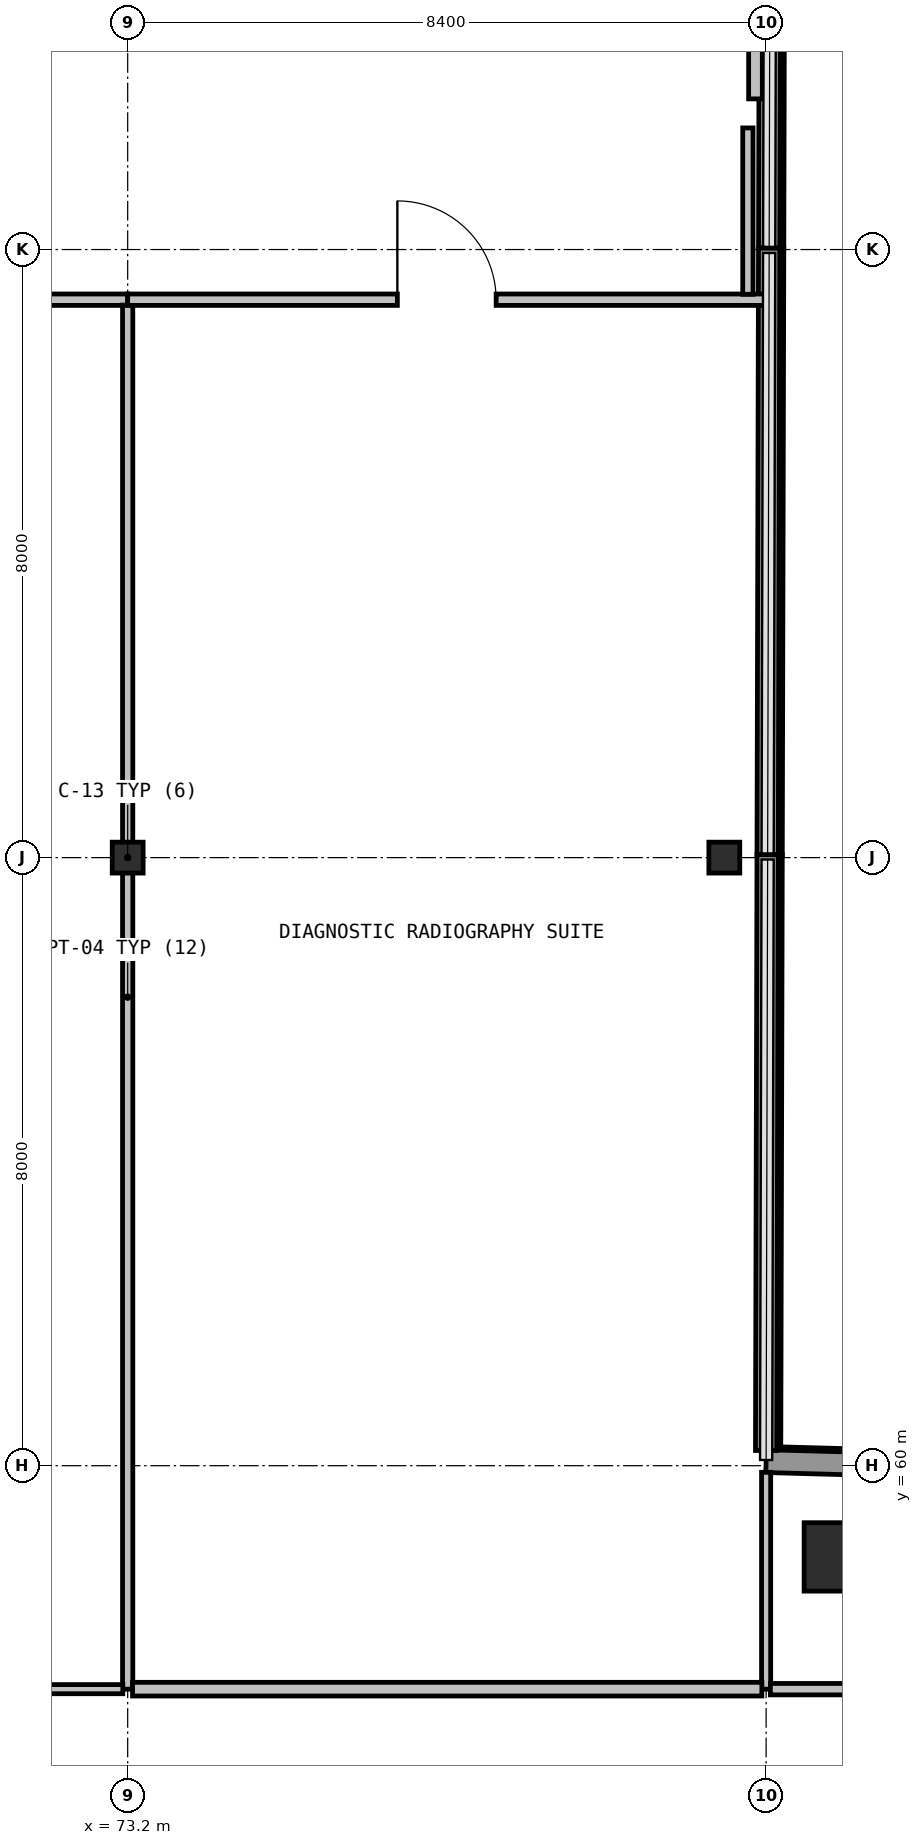
"""IFC4 building model, lengths in metres.
Left out: names, types, materials, properties, quantities, classifications, styles, units other than length and angle.
Written with IfcOpenShell. Run it as: python <this file> out.ifc"""

import sys

from ifc_helpers import new_model, si_unit, direction, frame, frame_2d, origin, origin_2d, place, context, subcontext, project, spatial, rectangle, hollow_circle, extrude, element, fill, save


model = new_model("IFC4")
c1 = context("Model", 3, precision=1e-05, world=origin(), true_north=direction((0.0, 1.0)))
c2 = subcontext(c1, "Body", "Model", "MODEL_VIEW")
j1 = project(units=[si_unit("LENGTHUNIT", "METRE"), si_unit("PLANEANGLEUNIT", "RADIAN")], contexts=[c1])
p1 = place(None, origin())
s1 = spatial("IfcSite", under=j1, at=p1, CompositionType="ELEMENT")
p2 = place(p1, origin())
s2 = spatial("IfcBuilding", under=s1, at=p2, CompositionType="ELEMENT")
p3 = place(p2, origin())
s3 = spatial("IfcBuildingStorey", under=s2, at=p3, CompositionType="ELEMENT", Elevation=0.0)
for number, where, z_axis, x_axis in (
    (1, (73.2, 68.0, 0.0), (0.0, 0.0, 1.0), (1.0, 0.0, 0.0)),
    (2, (81.05, 68.0, 0.0), (0.0, 0.0, 1.0), (1.0, 0.0, 0.0)),
):
    element("IfcColumn", number, at=place(p3, frame(where, z_axis=z_axis, x_axis=x_axis)), inside=s3, PredefinedType="COLUMN", context=c2, shape_type="SweptSolid", body=[
        extrude(hollow_circle(Radius=0.203, WallThickness=0.016, at=origin_2d()), origin(), (0.0, 0.0, 1.0), 5.4),
    ])
p4 = place(p3, frame((82.55, 58.8, 0.0), z_axis=(0.0, 0.0, 1.0), x_axis=(1.0, 0.0, 0.0)))
e3 = element("IfcColumn", 3, at=p4, inside=s3, PredefinedType="COLUMN", context=c2, shape_type="SweptSolid", body=[
    extrude(rectangle(XDim=0.9, YDim=0.9, at=origin_2d()), origin(), (0.0, 0.0, 1.0), 5.4),
])
p5 = place(p3, frame((81.6, 60.06, 0.0), z_axis=(0.0, 0.0, 1.0), x_axis=(0.999631579517, -0.027142314411, 0.0)))
e4 = element("IfcWall", 4, at=p5, inside=s3, PredefinedType="SOLIDWALL", context=c2, shape_type="SweptSolid", body=[
    extrude(rectangle(XDim=2.213, YDim=0.3, at=frame_2d((1.106, 0.0))), origin(), (0.0, 0.0, 1.0), 5.08),
])
p6 = place(p3, frame((81.66, 83.86, 0.0), z_axis=(0.0, 0.0, 1.0), x_axis=(-0.002554110965, -0.999996738253, 0.0)))
e5 = element("IfcWall", 5, at=p6, inside=s3, PredefinedType="SOLIDWALL", context=c2, shape_type="SweptSolid", body=[
    extrude(rectangle(XDim=7.838, YDim=0.28, at=frame_2d((3.919, 0.0))), origin(), (0.0, 0.0, 1.0), 0.94),
])
p7 = place(p3, frame((81.64, 76.018, 0.0), z_axis=(0.0, 0.0, 1.0), x_axis=(-0.002479331223, -0.999996926454, 0.0)))
e6 = element("IfcWall", 6, at=p7, inside=s3, PredefinedType="SOLIDWALL", context=c2, shape_type="SweptSolid", body=[
    extrude(rectangle(XDim=7.976, YDim=0.28, at=frame_2d((3.988, 0.0))), origin(), (0.0, 0.0, 1.0), 0.94),
])
p8 = place(p3, frame((81.62, 68.038, 0.0), z_axis=(0.0, 0.0, 1.0), x_axis=(-0.002554110965, -0.999996738253, 0.0)))
e7 = element("IfcWall", 7, at=p8, inside=s3, PredefinedType="SOLIDWALL", context=c2, shape_type="SweptSolid", body=[
    extrude(rectangle(XDim=7.838, YDim=0.28, at=frame_2d((3.919, 0.0))), origin(), (0.0, 0.0, 1.0), 0.94),
])
p9 = place(p3, frame((64.8, 75.34, 0.0), z_axis=(0.0, 0.0, 1.0), x_axis=(1.0, 0.0, 0.0)))
e8 = element("IfcWall", 8, at=p9, inside=s3, PredefinedType="PARTITIONING", context=c2, shape_type="SweptSolid", body=[
    extrude(rectangle(XDim=8.4, YDim=0.15, at=frame_2d((4.2, 0.0))), origin(), (0.0, 0.0, 1.0), 5.08),
])
p10 = place(p9, frame((3.675, 0.0, 0.0)))
e9 = element("IfcOpeningElement", 9, at=p10, cuts=e8, PredefinedType="OPENING", context=c2, shape_type="SweptSolid", body=[
    extrude(rectangle(XDim=1.05, YDim=2.15, at=frame_2d((0.525, 1.075))), frame((0.0, 0.085, 0.0), z_axis=(0.0, -1.0, 0.0), x_axis=(1.0, 0.0, 0.0)), (0.0, 0.0, 1.0), 0.17),
])
p11 = place(p3, frame((73.2, 75.269, 0.0), z_axis=(0.0, 0.0, 1.0), x_axis=(0.0, -1.0, 0.0)))
e10 = element("IfcWall", 10, at=p11, inside=s3, PredefinedType="PARTITIONING", context=c2, shape_type="SweptSolid", body=[
    extrude(rectangle(XDim=18.209, YDim=0.135, at=frame_2d((9.104, 0.0))), origin(), (0.0, 0.0, 1.0), 4.33),
])
p12 = place(p3, frame((73.136, 57.06, 0.0), z_axis=(0.0, 0.0, 1.0), x_axis=(-1.0, 0.0, 0.0)))
e11 = element("IfcWall", 11, at=p12, inside=s3, PredefinedType="PARTITIONING", context=c2, shape_type="SweptSolid", body=[
    extrude(rectangle(XDim=8.265, YDim=0.12, at=frame_2d((4.132, 0.0))), origin(), (0.0, 0.0, 1.0), 5.08),
])
p13 = place(p3, frame((73.2, 75.34, 0.0), z_axis=(0.0, 0.0, 1.0), x_axis=(1.0, 0.0, 0.0)))
e12 = element("IfcWall", 12, at=p13, inside=s3, PredefinedType="PARTITIONING", context=c2, shape_type="SweptSolid", body=[
    extrude(rectangle(XDim=8.396, YDim=0.15, at=frame_2d((4.198, 0.0))), origin(), (0.0, 0.0, 1.0), 5.08),
])
p14 = place(p13, frame((3.548, 0.0, 0.0)))
e13 = element("IfcOpeningElement", 13, at=p14, cuts=e12, PredefinedType="OPENING", context=c2, shape_type="SweptSolid", body=[
    extrude(rectangle(XDim=1.3, YDim=2.15, at=frame_2d((0.65, 1.075))), frame((0.0, 0.085, 0.0), z_axis=(0.0, -1.0, 0.0), x_axis=(1.0, 0.0, 0.0)), (0.0, 0.0, 1.0), 0.17),
])
p15 = place(p3, frame((81.36, 75.411, 0.0), z_axis=(0.0, 0.0, 1.0), x_axis=(0.0, 1.0, 0.0)))
e14 = element("IfcWall", 14, at=p15, inside=s3, PredefinedType="PARTITIONING", context=c2, shape_type="SweptSolid", body=[
    extrude(rectangle(XDim=2.189, YDim=0.135, at=frame_2d((1.095, 0.0))), origin(), (0.0, 0.0, 1.0), 4.33),
])
p16 = place(p3, frame((81.6, 59.913, 0.0), z_axis=(0.0, 0.0, 1.0), x_axis=(0.0, -1.0, 0.0)))
e15 = element("IfcWall", 15, at=p16, inside=s3, PredefinedType="PARTITIONING", context=c2, shape_type="SweptSolid", body=[
    extrude(rectangle(XDim=2.853, YDim=0.12, at=frame_2d((1.427, 0.0))), origin(), (0.0, 0.0, 1.0), 5.08),
])
p17 = place(p3, frame((81.544, 57.06, 0.0), z_axis=(0.0, 0.0, 1.0), x_axis=(-1.0, 0.0, 0.0)))
e16 = element("IfcWall", 16, at=p17, inside=s3, PredefinedType="PARTITIONING", context=c2, shape_type="SweptSolid", body=[
    extrude(rectangle(XDim=8.28, YDim=0.18, at=frame_2d((4.14, 0.0))), origin(), (0.0, 0.0, 1.0), 5.08),
])
p18 = place(p3, frame((84.861, 57.06, 0.0), z_axis=(0.0, 0.0, 1.0), x_axis=(-1.0, 0.0, 0.0)))
e17 = element("IfcWall", 17, at=p18, inside=s3, PredefinedType="PARTITIONING", context=c2, shape_type="SweptSolid", body=[
    extrude(rectangle(XDim=3.205, YDim=0.15, at=frame_2d((1.603, 0.0))), origin(), (0.0, 0.0, 1.0), 5.08),
])
p19 = place(p18, frame((0.768, 0.0, 0.0)))
e18 = element("IfcOpeningElement", 18, at=p19, cuts=e17, PredefinedType="OPENING", context=c2, shape_type="SweptSolid", body=[
    extrude(rectangle(XDim=0.9, YDim=2.1, at=frame_2d((0.45, 1.05))), frame((0.0, 0.085, 0.0), z_axis=(0.0, -1.0, 0.0), x_axis=(1.0, 0.0, 0.0)), (0.0, 0.0, 1.0), 0.17),
])
p20 = place(p3, frame((81.46, 79.474, 0.0), z_axis=(0.0, 0.0, 1.0), x_axis=(0.0, -1.0, 0.0)))
e19 = element("IfcWall", 19, at=p20, inside=s3, PredefinedType="PARTITIONING", context=c2, shape_type="SweptSolid", body=[
    extrude(rectangle(XDim=1.492, YDim=0.18, at=frame_2d((0.746, 0.0))), origin(), (0.0, 0.0, 1.0), 5.08),
])
p21 = place(p14, origin())
e20 = element("IfcDoor", 20, at=p21, inside=s3, OperationType="SINGLE_SWING_RIGHT", PredefinedType="DOOR", context=c2, shape_type="SweptSolid", body=[
    extrude(rectangle(XDim=1.3, YDim=2.15, at=frame_2d((0.65, 1.075))), frame((0.0, 0.025, 0.0), z_axis=(0.0, -1.0, 0.0), x_axis=(1.0, 0.0, 0.0)), (0.0, 0.0, 1.0), 0.05),
])
fill(e13, e20)
save(model, sys.argv[1])
